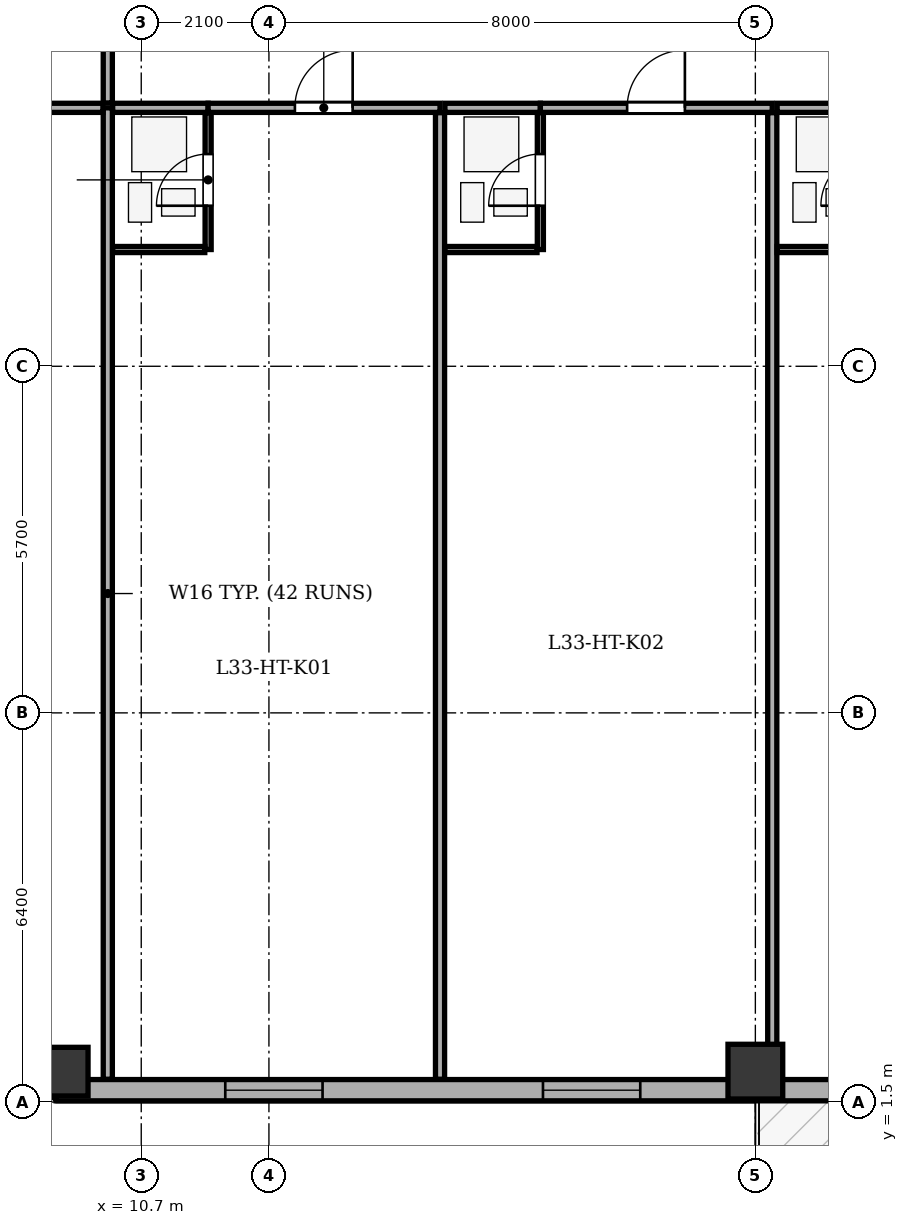
"""IFC4 building model, lengths in metres.
Left out: names, types, materials, properties, quantities, classifications, styles, units other than length and angle.
Written with IfcOpenShell. Run it as: python <this file> out.ifc"""

import sys

from ifc_helpers import new_model, si_unit, direction, frame, frame_2d, origin, origin_2d, place, context, subcontext, project, spatial, rectangle, extrude, element, fill, save


model = new_model("IFC4")
c1 = context("Model", 3, precision=1e-05, world=origin(), true_north=direction((0.0, 1.0)))
c2 = subcontext(c1, "Body", "Model", "MODEL_VIEW")
j1 = project(units=[si_unit("LENGTHUNIT", "METRE"), si_unit("PLANEANGLEUNIT", "RADIAN")], contexts=[c1])
p1 = place(None, origin())
s1 = spatial("IfcSite", under=j1, at=p1, CompositionType="ELEMENT")
p2 = place(p1, origin())
s2 = spatial("IfcBuilding", under=s1, at=p2, CompositionType="ELEMENT")
p3 = place(p2, frame((0.0, 0.0, 134.3)))
s3 = spatial("IfcBuildingStorey", under=s2, at=p3, CompositionType="ELEMENT", Elevation=134.3)
p4 = place(p3, frame((9.3, 2.0, 0.0), z_axis=(0.0, 0.0, 1.0), x_axis=(1.0, 0.0, 0.0)))
e1 = element("IfcColumn", 1, at=p4, inside=s3, PredefinedType="COLUMN", context=c2, shape_type="SweptSolid", body=[
    extrude(rectangle(XDim=0.8, YDim=1.05, at=origin_2d()), origin(), (0.0, 0.0, 1.0), 3.5),
])
p5 = place(p3, frame((20.8, 2.0, 0.0), z_axis=(0.0, 0.0, 1.0), x_axis=(1.0, 0.0, 0.0)))
e2 = element("IfcColumn", 2, at=p5, inside=s3, PredefinedType="COLUMN", context=c2, shape_type="SweptSolid", body=[
    extrude(rectangle(XDim=0.9, YDim=0.9, at=origin_2d()), origin(), (0.0, 0.0, 1.0), 3.5),
])
p6 = place(p3, frame((44.3, 1.695, 0.0), z_axis=(0.0, 0.0, 1.0), x_axis=(-1.0, 0.0, 0.0)))
e3 = element("IfcWall", 3, at=p6, inside=s3, PredefinedType="STANDARD", context=c2, shape_type="SweptSolid", body=[
    extrude(rectangle(XDim=35.0, YDim=0.35, at=frame_2d((17.5, 0.0))), origin(), (0.0, 0.0, 1.0), 2.785),
])
p7 = place(p6, frame((19.6, 0.0, 0.0)))
e4 = element("IfcOpeningElement", 4, at=p7, cuts=e3, PredefinedType="OPENING", context=c2, shape_type="SweptSolid", body=[
    extrude(rectangle(XDim=1.0, YDim=2.02, at=frame_2d((0.5, 1.01))), frame((0.0, 0.185, 0.0), z_axis=(0.0, -1.0, 0.0), x_axis=(1.0, 0.0, 0.0)), (0.0, 0.0, 1.0), 0.37),
])
p8 = place(p6, frame((2.24, 0.0, 0.75)))
e5 = element("IfcOpeningElement", 5, at=p8, cuts=e3, PredefinedType="OPENING", context=c2, shape_type="SweptSolid", body=[
    extrude(rectangle(XDim=1.6, YDim=1.75, at=frame_2d((0.8, 0.875))), frame((0.0, 0.185, 0.0), z_axis=(0.0, -1.0, 0.0), x_axis=(1.0, 0.0, 0.0)), (0.0, 0.0, 1.0), 0.37),
])
p9 = place(p6, frame((6.678, 0.0, 0.75)))
e6 = element("IfcOpeningElement", 6, at=p9, cuts=e3, PredefinedType="OPENING", context=c2, shape_type="SweptSolid", body=[
    extrude(rectangle(XDim=1.35, YDim=1.75, at=frame_2d((0.675, 0.875))), frame((0.0, 0.185, 0.0), z_axis=(0.0, -1.0, 0.0), x_axis=(1.0, 0.0, 0.0)), (0.0, 0.0, 1.0), 0.37),
])
p10 = place(p6, frame((13.055, 0.0, 0.75)))
e7 = element("IfcOpeningElement", 7, at=p10, cuts=e3, PredefinedType="OPENING", context=c2, shape_type="SweptSolid", body=[
    extrude(rectangle(XDim=1.6, YDim=1.75, at=frame_2d((0.8, 0.875))), frame((0.0, 0.185, 0.0), z_axis=(0.0, -1.0, 0.0), x_axis=(1.0, 0.0, 0.0)), (0.0, 0.0, 1.0), 0.37),
])
p11 = place(p6, frame((25.393, 0.0, 0.75)))
e8 = element("IfcOpeningElement", 8, at=p11, cuts=e3, PredefinedType="OPENING", context=c2, shape_type="SweptSolid", body=[
    extrude(rectangle(XDim=1.6, YDim=1.75, at=frame_2d((0.8, 0.875))), frame((0.0, 0.185, 0.0), z_axis=(0.0, -1.0, 0.0), x_axis=(1.0, 0.0, 0.0)), (0.0, 0.0, 1.0), 0.37),
])
p12 = place(p6, frame((30.618, 0.0, 0.75)))
e9 = element("IfcOpeningElement", 9, at=p12, cuts=e3, PredefinedType="OPENING", context=c2, shape_type="SweptSolid", body=[
    extrude(rectangle(XDim=1.6, YDim=1.75, at=frame_2d((0.8, 0.875))), frame((0.0, 0.185, 0.0), z_axis=(0.0, -1.0, 0.0), x_axis=(1.0, 0.0, 0.0)), (0.0, 0.0, 1.0), 0.37),
])
p13 = place(p3, frame((9.3, 1.695, 0.0), z_axis=(0.0, 0.0, 1.0), x_axis=(-0.707106781187, 0.707106781187, 0.0)))
e10 = element("IfcWall", 10, at=p13, inside=s3, PredefinedType="STANDARD", context=c2, shape_type="SweptSolid", body=[
    extrude(rectangle(XDim=6.795, YDim=0.35, at=frame_2d((3.397, 0.0))), origin(), (0.0, 0.0, 1.0), 2.785),
])
p14 = place(p13, frame((2.698, 0.0, 0.75)))
e11 = element("IfcOpeningElement", 11, at=p14, cuts=e10, PredefinedType="OPENING", context=c2, shape_type="SweptSolid", body=[
    extrude(rectangle(XDim=1.4, YDim=1.65, at=frame_2d((0.7, 0.825))), frame((0.0, 0.185, 0.0), z_axis=(0.0, -1.0, 0.0), x_axis=(1.0, 0.0, 0.0)), (0.0, 0.0, 1.0), 0.37),
])
p15 = place(p3, frame((10.15, 1.875, 0.0), z_axis=(0.0, 0.0, 1.0), x_axis=(0.0, 1.0, 0.0)))
e12 = element("IfcWall", 12, at=p15, inside=s3, PredefinedType="PARTITIONING", context=c2, shape_type="SweptSolid", body=[
    extrude(rectangle(XDim=15.975, YDim=0.15, at=frame_2d((7.988, 0.0))), origin(), (0.0, 0.0, 1.0), 3.2),
])
p16 = place(p3, frame((10.23, 17.85, 0.0), z_axis=(0.0, 0.0, 1.0), x_axis=(1.0, 0.0, 0.0)))
e13 = element("IfcWall", 13, at=p16, inside=s3, PredefinedType="PARTITIONING", context=c2, shape_type="SweptSolid", body=[
    extrude(rectangle(XDim=1.57, YDim=0.15, at=frame_2d((0.785, 0.0))), origin(), (0.0, 0.0, 1.0), 3.2),
])
p17 = place(p3, frame((11.8, 17.85, 0.0), z_axis=(0.0, 0.0, 1.0), x_axis=(1.0, 0.0, 0.0)))
e14 = element("IfcWall", 14, at=p17, inside=s3, PredefinedType="PARTITIONING", context=c2, shape_type="SweptSolid", body=[
    extrude(rectangle(XDim=3.814, YDim=0.15, at=frame_2d((1.907, 0.0))), origin(), (0.0, 0.0, 1.0), 3.2),
])
p18 = place(p17, frame((1.427, 0.0, 0.0)))
e15 = element("IfcOpeningElement", 15, at=p18, cuts=e14, PredefinedType="OPENING", context=c2, shape_type="SweptSolid", body=[
    extrude(rectangle(XDim=0.95, YDim=2.1, at=frame_2d((0.475, 1.05))), frame((0.0, 0.085, 0.0), z_axis=(0.0, -1.0, 0.0), x_axis=(1.0, 0.0, 0.0)), (0.0, 0.0, 1.0), 0.17),
])
p19 = place(p3, frame((11.8, 15.52, 0.0), z_axis=(0.0, 0.0, 1.0), x_axis=(0.0, 1.0, 0.0)))
e16 = element("IfcWall", 16, at=p19, inside=s3, PredefinedType="PARTITIONING", context=c2, shape_type="SweptSolid", body=[
    extrude(rectangle(XDim=2.25, YDim=0.1, at=frame_2d((1.125, 0.0))), origin(), (0.0, 0.0, 1.0), 3.2),
])
p20 = place(p19, frame((0.72, 0.0, 0.0)))
e17 = element("IfcOpeningElement", 17, at=p20, cuts=e16, PredefinedType="OPENING", context=c2, shape_type="SweptSolid", body=[
    extrude(rectangle(XDim=0.85, YDim=2.05, at=frame_2d((0.425, 1.025))), frame((0.0, 0.06, 0.0), z_axis=(0.0, -1.0, 0.0), x_axis=(1.0, 0.0, 0.0)), (0.0, 0.0, 1.0), 0.12),
])
p21 = place(p3, frame((10.23, 15.52, 0.0), z_axis=(0.0, 0.0, 1.0), x_axis=(1.0, 0.0, 0.0)))
e18 = element("IfcWall", 18, at=p21, inside=s3, PredefinedType="PARTITIONING", context=c2, shape_type="SweptSolid", body=[
    extrude(rectangle(XDim=1.515, YDim=0.1, at=frame_2d((0.758, 0.0))), origin(), (0.0, 0.0, 1.0), 3.2),
])
p22 = place(p3, frame((15.614, 1.875, 0.0), z_axis=(0.0, 0.0, 1.0), x_axis=(0.0, 1.0, 0.0)))
e19 = element("IfcWall", 19, at=p22, inside=s3, PredefinedType="PARTITIONING", context=c2, shape_type="SweptSolid", body=[
    extrude(rectangle(XDim=15.895, YDim=0.15, at=frame_2d((7.948, 0.0))), origin(), (0.0, 0.0, 1.0), 3.2),
])
p23 = place(p3, frame((15.694, 17.85, 0.0), z_axis=(0.0, 0.0, 1.0), x_axis=(1.0, 0.0, 0.0)))
e20 = element("IfcWall", 20, at=p23, inside=s3, PredefinedType="PARTITIONING", context=c2, shape_type="SweptSolid", body=[
    extrude(rectangle(XDim=1.57, YDim=0.15, at=frame_2d((0.785, 0.0))), origin(), (0.0, 0.0, 1.0), 3.2),
])
p24 = place(p3, frame((17.264, 17.85, 0.0), z_axis=(0.0, 0.0, 1.0), x_axis=(1.0, 0.0, 0.0)))
e21 = element("IfcWall", 21, at=p24, inside=s3, PredefinedType="PARTITIONING", context=c2, shape_type="SweptSolid", body=[
    extrude(rectangle(XDim=3.814, YDim=0.15, at=frame_2d((1.907, 0.0))), origin(), (0.0, 0.0, 1.0), 3.2),
])
p25 = place(p24, frame((1.427, 0.0, 0.0)))
e22 = element("IfcOpeningElement", 22, at=p25, cuts=e21, PredefinedType="OPENING", context=c2, shape_type="SweptSolid", body=[
    extrude(rectangle(XDim=0.95, YDim=2.1, at=frame_2d((0.475, 1.05))), frame((0.0, 0.085, 0.0), z_axis=(0.0, -1.0, 0.0), x_axis=(1.0, 0.0, 0.0)), (0.0, 0.0, 1.0), 0.17),
])
p26 = place(p3, frame((17.264, 15.52, 0.0), z_axis=(0.0, 0.0, 1.0), x_axis=(0.0, 1.0, 0.0)))
e23 = element("IfcWall", 23, at=p26, inside=s3, PredefinedType="PARTITIONING", context=c2, shape_type="SweptSolid", body=[
    extrude(rectangle(XDim=2.25, YDim=0.1, at=frame_2d((1.125, 0.0))), origin(), (0.0, 0.0, 1.0), 3.2),
])
p27 = place(p26, frame((0.72, 0.0, 0.0)))
e24 = element("IfcOpeningElement", 24, at=p27, cuts=e23, PredefinedType="OPENING", context=c2, shape_type="SweptSolid", body=[
    extrude(rectangle(XDim=0.85, YDim=2.05, at=frame_2d((0.425, 1.025))), frame((0.0, 0.06, 0.0), z_axis=(0.0, -1.0, 0.0), x_axis=(1.0, 0.0, 0.0)), (0.0, 0.0, 1.0), 0.12),
])
p28 = place(p3, frame((15.694, 15.52, 0.0), z_axis=(0.0, 0.0, 1.0), x_axis=(1.0, 0.0, 0.0)))
e25 = element("IfcWall", 25, at=p28, inside=s3, PredefinedType="PARTITIONING", context=c2, shape_type="SweptSolid", body=[
    extrude(rectangle(XDim=1.515, YDim=0.1, at=frame_2d((0.757, 0.0))), origin(), (0.0, 0.0, 1.0), 3.2),
])
p29 = place(p3, frame((21.078, 1.875, 0.0), z_axis=(0.0, 0.0, 1.0), x_axis=(0.0, 1.0, 0.0)))
e26 = element("IfcWall", 26, at=p29, inside=s3, PredefinedType="PARTITIONING", context=c2, shape_type="SweptSolid", body=[
    extrude(rectangle(XDim=15.895, YDim=0.15, at=frame_2d((7.948, 0.0))), origin(), (0.0, 0.0, 1.0), 2.535),
])
p30 = place(p3, frame((21.158, 17.85, 0.0), z_axis=(0.0, 0.0, 1.0), x_axis=(1.0, 0.0, 0.0)))
e27 = element("IfcWall", 27, at=p30, inside=s3, PredefinedType="PARTITIONING", context=c2, shape_type="SweptSolid", body=[
    extrude(rectangle(XDim=1.57, YDim=0.15, at=frame_2d((0.785, 0.0))), origin(), (0.0, 0.0, 1.0), 3.2),
])
p31 = place(p3, frame((21.158, 15.52, 0.0), z_axis=(0.0, 0.0, 1.0), x_axis=(1.0, 0.0, 0.0)))
e28 = element("IfcWall", 28, at=p31, inside=s3, PredefinedType="PARTITIONING", context=c2, shape_type="SweptSolid", body=[
    extrude(rectangle(XDim=1.515, YDim=0.1, at=frame_2d((0.758, 0.0))), origin(), (0.0, 0.0, 1.0), 3.2),
])
p32 = place(p3, frame((4.675, 17.85, 0.0), z_axis=(0.0, 0.0, 1.0), x_axis=(1.0, 0.0, 0.0)))
e29 = element("IfcWall", 29, at=p32, inside=s3, PredefinedType="PARTITIONING", context=c2, shape_type="SweptSolid", body=[
    extrude(rectangle(XDim=5.395, YDim=0.15, at=frame_2d((2.698, 0.0))), origin(), (0.0, 0.0, 1.0), 3.2),
])
p33 = place(p3, frame((10.15, 17.93, 0.0), z_axis=(0.0, 0.0, 1.0), x_axis=(0.0, 1.0, 0.0)))
e30 = element("IfcWall", 30, at=p33, inside=s3, PredefinedType="PARTITIONING", context=c2, shape_type="SweptSolid", body=[
    extrude(rectangle(XDim=9.27, YDim=0.15, at=frame_2d((4.635, 0.0))), origin(), (0.0, 0.0, 1.0), 3.2),
])
p34 = place(p33, frame((4.115, 0.0, 0.0)))
e31 = element("IfcOpeningElement", 31, at=p34, cuts=e30, PredefinedType="OPENING", context=c2, shape_type="SweptSolid", body=[
    extrude(rectangle(XDim=0.95, YDim=2.1, at=frame_2d((0.475, 1.05))), frame((0.0, 0.085, 0.0), z_axis=(0.0, -1.0, 0.0), x_axis=(1.0, 0.0, 0.0)), (0.0, 0.0, 1.0), 0.17),
])
p35 = place(p11, origin())
e32 = element("IfcWindow", 32, at=p35, inside=s3, PartitioningType="SINGLE_PANEL", PredefinedType="WINDOW", context=c2, shape_type="SweptSolid", body=[
    extrude(rectangle(XDim=1.6, YDim=1.75, at=frame_2d((0.8, 0.875))), frame((0.0, -0.01, 0.0), z_axis=(0.0, -1.0, 0.0), x_axis=(1.0, 0.0, 0.0)), (0.0, 0.0, 1.0), 0.06),
])
fill(e8, e32)
p36 = place(p12, origin())
e33 = element("IfcWindow", 33, at=p36, inside=s3, PartitioningType="SINGLE_PANEL", PredefinedType="WINDOW", context=c2, shape_type="SweptSolid", body=[
    extrude(rectangle(XDim=1.6, YDim=1.75, at=frame_2d((0.8, 0.875))), frame((0.0, -0.01, 0.0), z_axis=(0.0, -1.0, 0.0), x_axis=(1.0, 0.0, 0.0)), (0.0, 0.0, 1.0), 0.06),
])
fill(e9, e33)
p37 = place(p20, origin())
e34 = element("IfcDoor", 34, at=p37, inside=s3, OperationType="SINGLE_SWING_LEFT", PredefinedType="DOOR", context=c2, shape_type="SweptSolid", body=[
    extrude(rectangle(XDim=0.85, YDim=2.05, at=frame_2d((0.425, 1.025))), frame((0.0, 0.025, 0.0), z_axis=(0.0, -1.0, 0.0), x_axis=(1.0, 0.0, 0.0)), (0.0, 0.0, 1.0), 0.05),
])
fill(e17, e34)
p38 = place(p18, origin())
e35 = element("IfcDoor", 35, at=p38, inside=s3, OperationType="SINGLE_SWING_RIGHT", PredefinedType="DOOR", context=c2, shape_type="SweptSolid", body=[
    extrude(rectangle(XDim=0.95, YDim=2.1, at=frame_2d((0.475, 1.05))), frame((0.0, 0.025, 0.0), z_axis=(0.0, -1.0, 0.0), x_axis=(1.0, 0.0, 0.0)), (0.0, 0.0, 1.0), 0.05),
])
fill(e15, e35)
p39 = place(p27, origin())
e36 = element("IfcDoor", 36, at=p39, inside=s3, OperationType="SINGLE_SWING_LEFT", PredefinedType="DOOR", context=c2, shape_type="SweptSolid", body=[
    extrude(rectangle(XDim=0.85, YDim=2.05, at=frame_2d((0.425, 1.025))), frame((0.0, 0.025, 0.0), z_axis=(0.0, -1.0, 0.0), x_axis=(1.0, 0.0, 0.0)), (0.0, 0.0, 1.0), 0.05),
])
fill(e24, e36)
p40 = place(p25, origin())
e37 = element("IfcDoor", 37, at=p40, inside=s3, OperationType="SINGLE_SWING_RIGHT", PredefinedType="DOOR", context=c2, shape_type="SweptSolid", body=[
    extrude(rectangle(XDim=0.95, YDim=2.1, at=frame_2d((0.475, 1.05))), frame((0.0, 0.025, 0.0), z_axis=(0.0, -1.0, 0.0), x_axis=(1.0, 0.0, 0.0)), (0.0, 0.0, 1.0), 0.05),
])
fill(e22, e37)
save(model, sys.argv[1])
